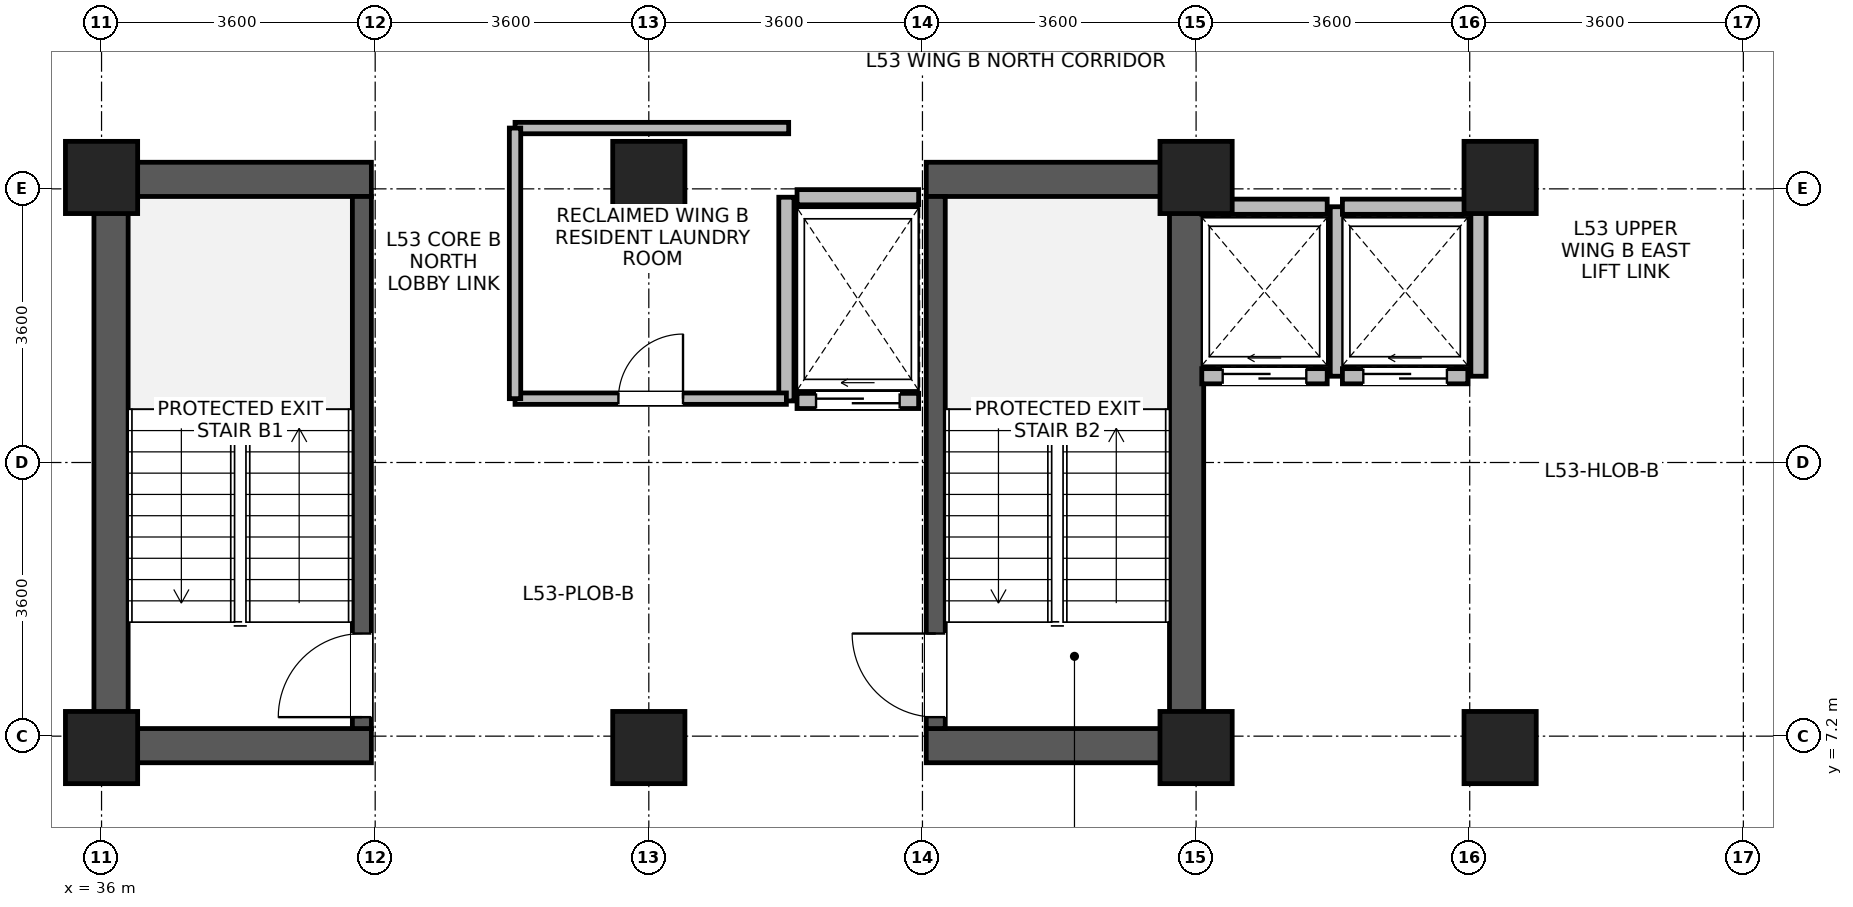
"""IFC4 building model, lengths in metres.
Left out: names, types, materials, properties, quantities, classifications, styles, units other than length and angle.
Written with IfcOpenShell. Run it as: python <this file> out.ifc"""

import sys

from ifc_helpers import new_model, si_unit, direction, frame, frame_2d, origin, origin_2d, place, context, subcontext, project, spatial, rectangle, extrude, source, transform, mapped, element, fill, save


model = new_model("IFC4")
c1 = context("Model", 3, precision=1e-05, world=origin(), true_north=direction((0.0, 1.0)))
c2 = subcontext(c1, "Body", "Model", "MODEL_VIEW")
j1 = project(units=[si_unit("LENGTHUNIT", "METRE"), si_unit("PLANEANGLEUNIT", "RADIAN")], contexts=[c1])
p1 = place(None, origin())
s1 = spatial("IfcSite", under=j1, at=p1, CompositionType="ELEMENT")
p2 = place(p1, origin())
s2 = spatial("IfcBuilding", under=s1, at=p2, CompositionType="ELEMENT")
p3 = place(p2, frame((0.0, 0.0, 209.2)))
s3 = spatial("IfcBuildingStorey", under=s2, at=p3, CompositionType="ELEMENT", Elevation=209.2)
for number, where, z_axis, x_axis in (
    (1, (36.125, 6.85, 0.0), (0.0, 0.0, 1.0), (0.0, 1.0, 0.0)),
    (2, (50.275, 6.85, 0.0), (0.0, 0.0, 1.0), (0.0, 1.0, 0.0)),
):
    element("IfcWall", number, at=place(p3, frame(where, z_axis=z_axis, x_axis=x_axis)), inside=s3, PredefinedType="SHEAR", context=c2, shape_type="SweptSolid", body=[
        extrude(rectangle(XDim=7.9, YDim=0.45, at=frame_2d((3.95, 0.0))), origin(), (0.0, 0.0, 1.0), 3.47),
    ])
for number, where, z_axis, x_axis in (
    (3, (36.35, 7.075, 0.0), (0.0, 0.0, 1.0), (1.0, 0.0, 0.0)),
    (4, (46.85, 7.075, 0.0), (0.0, 0.0, 1.0), (1.0, 0.0, 0.0)),
    (5, (36.35, 14.525, 0.0), (0.0, 0.0, 1.0), (1.0, 0.0, 0.0)),
    (6, (46.85, 14.525, 0.0), (0.0, 0.0, 1.0), (1.0, 0.0, 0.0)),
):
    element("IfcWall", number, at=place(p3, frame(where, z_axis=z_axis, x_axis=x_axis)), inside=s3, PredefinedType="SHEAR", context=c2, shape_type="SweptSolid", body=[
        extrude(rectangle(XDim=3.2, YDim=0.45, at=frame_2d((1.6, 0.0))), origin(), (0.0, 0.0, 1.0), 3.47),
    ])
p4 = place(p3, frame((39.425, 7.3, 0.0), z_axis=(0.0, 0.0, 1.0), x_axis=(0.0, 1.0, 0.0)))
e7 = element("IfcWall", 7, at=p4, inside=s3, PredefinedType="SHEAR", context=c2, shape_type="SweptSolid", body=[
    extrude(rectangle(XDim=7.0, YDim=0.25, at=frame_2d((3.5, 0.0))), origin(), (0.0, 0.0, 1.0), 3.47),
])
p5 = place(p4, frame((0.15, 0.0, 0.0)))
e8 = element("IfcOpeningElement", 8, at=p5, cuts=e7, PredefinedType="OPENING", context=c2, shape_type="SweptSolid", body=[
    extrude(rectangle(XDim=1.1, YDim=2.08, at=frame_2d((0.55, 1.04))), frame((0.0, 0.135, 0.0), z_axis=(0.0, -1.0, 0.0), x_axis=(1.0, 0.0, 0.0)), (0.0, 0.0, 1.0), 0.27),
])
p6 = place(p3, frame((46.975, 7.3, 0.0), z_axis=(0.0, 0.0, 1.0), x_axis=(0.0, 1.0, 0.0)))
e9 = element("IfcWall", 9, at=p6, inside=s3, PredefinedType="SHEAR", context=c2, shape_type="SweptSolid", body=[
    extrude(rectangle(XDim=7.0, YDim=0.25, at=frame_2d((3.5, 0.0))), origin(), (0.0, 0.0, 1.0), 3.47),
])
p7 = place(p6, frame((0.15, 0.0, 0.0)))
e10 = element("IfcOpeningElement", 10, at=p7, cuts=e9, PredefinedType="OPENING", context=c2, shape_type="SweptSolid", body=[
    extrude(rectangle(XDim=1.1, YDim=2.08, at=frame_2d((0.55, 1.04))), frame((0.0, 0.135, 0.0), z_axis=(0.0, -1.0, 0.0), x_axis=(1.0, 0.0, 0.0)), (0.0, 0.0, 1.0), 0.27),
])
m1 = source(origin(), c2, "Body", "SweptSolid", [
    extrude(rectangle(XDim=0.95, YDim=0.95, at=origin_2d()), origin(), (0.0, 0.0, 1.0), 3.7),
])
for number, where, z_axis, x_axis in (
    (11, (36.0, 7.05, 0.0), (0.0, 0.0, 1.0), (1.0, 0.0, 0.0)),
    (12, (36.0, 14.55, 0.0), (0.0, 0.0, 1.0), (1.0, 0.0, 0.0)),
    (13, (43.2, 7.05, 0.0), (0.0, 0.0, 1.0), (1.0, 0.0, 0.0)),
    (14, (43.2, 14.55, 0.0), (0.0, 0.0, 1.0), (1.0, 0.0, 0.0)),
    (15, (50.4, 7.05, 0.0), (0.0, 0.0, 1.0), (1.0, 0.0, 0.0)),
    (16, (50.4, 14.55, 0.0), (0.0, 0.0, 1.0), (1.0, 0.0, 0.0)),
    (17, (54.4, 7.05, 0.0), (0.0, 0.0, 1.0), (1.0, 0.0, 0.0)),
    (18, (54.4, 14.55, 0.0), (0.0, 0.0, 1.0), (1.0, 0.0, 0.0)),
):
    element("IfcColumn", number, at=place(p3, frame(where, z_axis=z_axis, x_axis=x_axis)), inside=s3, PredefinedType="COLUMN", context=c2, shape_type="MappedRepresentation", body=[
        mapped(m1, transform((0.0, 0.0, 0.0), x_axis=(1.0, 0.0, 0.0), y_axis=(0.0, 1.0, 0.0), z_axis=(0.0, 0.0, 1.0), scale=1.0)),
    ])
p8 = place(p3, frame((50.475, 11.935, 0.0), z_axis=(0.0, 0.0, 1.0), x_axis=(1.0, 0.0, 0.0)))
e19 = element("IfcWall", 19, at=p8, inside=s3, PredefinedType="PARTITIONING", context=c2, shape_type="SweptSolid", body=[
    extrude(rectangle(XDim=1.65, YDim=0.2, at=frame_2d((0.825, 0.0))), origin(), (0.0, 0.0, 1.0), 3.45),
])
p9 = place(p8, frame((0.275, 0.0, 0.0)))
e20 = element("IfcOpeningElement", 20, at=p9, cuts=e19, PredefinedType="OPENING", context=c2, shape_type="SweptSolid", body=[
    extrude(rectangle(XDim=1.1, YDim=2.12, at=frame_2d((0.55, 1.06))), frame((0.0, 0.11, 0.0), z_axis=(0.0, -1.0, 0.0), x_axis=(1.0, 0.0, 0.0)), (0.0, 0.0, 1.0), 0.22),
])
p10 = place(p3, frame((50.475, 14.165, 0.0), z_axis=(0.0, 0.0, 1.0), x_axis=(1.0, 0.0, 0.0)))
e21 = element("IfcWall", 21, at=p10, inside=s3, PredefinedType="PARTITIONING", context=c2, shape_type="SweptSolid", body=[
    extrude(rectangle(XDim=1.65, YDim=0.2, at=frame_2d((0.825, 0.0))), origin(), (0.0, 0.0, 1.0), 3.45),
])
p11 = place(p3, frame((52.265, 11.935, 0.0), z_axis=(0.0, 0.0, 1.0), x_axis=(0.0, 1.0, 0.0)))
e22 = element("IfcWall", 22, at=p11, inside=s3, PredefinedType="PARTITIONING", context=c2, shape_type="SweptSolid", body=[
    extrude(rectangle(XDim=2.23, YDim=0.2, at=frame_2d((1.115, 0.0))), origin(), (0.0, 0.0, 1.0), 3.45),
])
p12 = place(p3, frame((52.325, 11.935, 0.0), z_axis=(0.0, 0.0, 1.0), x_axis=(1.0, 0.0, 0.0)))
e23 = element("IfcWall", 23, at=p12, inside=s3, PredefinedType="PARTITIONING", context=c2, shape_type="SweptSolid", body=[
    extrude(rectangle(XDim=1.65, YDim=0.2, at=frame_2d((0.825, 0.0))), origin(), (0.0, 0.0, 1.0), 3.45),
])
p13 = place(p12, frame((0.275, 0.0, 0.0)))
e24 = element("IfcOpeningElement", 24, at=p13, cuts=e23, PredefinedType="OPENING", context=c2, shape_type="SweptSolid", body=[
    extrude(rectangle(XDim=1.1, YDim=2.12, at=frame_2d((0.55, 1.06))), frame((0.0, 0.11, 0.0), z_axis=(0.0, -1.0, 0.0), x_axis=(1.0, 0.0, 0.0)), (0.0, 0.0, 1.0), 0.22),
])
p14 = place(p3, frame((52.325, 14.165, 0.0), z_axis=(0.0, 0.0, 1.0), x_axis=(1.0, 0.0, 0.0)))
e25 = element("IfcWall", 25, at=p14, inside=s3, PredefinedType="PARTITIONING", context=c2, shape_type="SweptSolid", body=[
    extrude(rectangle(XDim=1.65, YDim=0.2, at=frame_2d((0.825, 0.0))), origin(), (0.0, 0.0, 1.0), 3.45),
])
p15 = place(p3, frame((54.115, 11.935, 0.0), z_axis=(0.0, 0.0, 1.0), x_axis=(0.0, 1.0, 0.0)))
e26 = element("IfcWall", 26, at=p15, inside=s3, PredefinedType="PARTITIONING", context=c2, shape_type="SweptSolid", body=[
    extrude(rectangle(XDim=2.23, YDim=0.2, at=frame_2d((1.115, 0.0))), origin(), (0.0, 0.0, 1.0), 3.45),
])
p16 = place(p3, frame((45.15, 11.61, 0.0), z_axis=(0.0, 0.0, 1.0), x_axis=(1.0, 0.0, 0.0)))
e27 = element("IfcWall", 27, at=p16, inside=s3, PredefinedType="PARTITIONING", context=c2, shape_type="SweptSolid", body=[
    extrude(rectangle(XDim=1.6, YDim=0.2, at=frame_2d((0.8, 0.0))), origin(), (0.0, 0.0, 1.0), 3.45),
])
p17 = place(p16, frame((0.25, 0.0, 0.0)))
e28 = element("IfcOpeningElement", 28, at=p17, cuts=e27, PredefinedType="OPENING", context=c2, shape_type="SweptSolid", body=[
    extrude(rectangle(XDim=1.1, YDim=2.12, at=frame_2d((0.55, 1.06))), frame((0.0, 0.11, 0.0), z_axis=(0.0, -1.0, 0.0), x_axis=(1.0, 0.0, 0.0)), (0.0, 0.0, 1.0), 0.22),
])
p18 = place(p3, frame((45.15, 14.29, 0.0), z_axis=(0.0, 0.0, 1.0), x_axis=(1.0, 0.0, 0.0)))
e29 = element("IfcWall", 29, at=p18, inside=s3, PredefinedType="PARTITIONING", context=c2, shape_type="SweptSolid", body=[
    extrude(rectangle(XDim=1.6, YDim=0.2, at=frame_2d((0.8, 0.0))), origin(), (0.0, 0.0, 1.0), 2.45),
])
p19 = place(p3, frame((45.01, 11.61, 0.0), z_axis=(0.0, 0.0, 1.0), x_axis=(0.0, 1.0, 0.0)))
e30 = element("IfcWall", 30, at=p19, inside=s3, PredefinedType="PARTITIONING", context=c2, shape_type="SweptSolid", body=[
    extrude(rectangle(XDim=2.68, YDim=0.2, at=frame_2d((1.34, 0.0))), origin(), (0.0, 0.0, 1.0), 3.45),
])
p20 = place(p3, frame((41.44, 11.64, 0.0), z_axis=(0.0, 0.0, 1.0), x_axis=(1.0, 0.0, 0.0)))
e31 = element("IfcWall", 31, at=p20, inside=s3, PredefinedType="PARTITIONING", context=c2, shape_type="SweptSolid", body=[
    extrude(rectangle(XDim=3.57, YDim=0.15, at=frame_2d((1.785, 0.0))), origin(), (0.0, 0.0, 1.0), 3.45),
])
p21 = place(p20, frame((1.36, 0.0, 0.0)))
e32 = element("IfcOpeningElement", 32, at=p21, cuts=e31, PredefinedType="OPENING", context=c2, shape_type="SweptSolid", body=[
    extrude(rectangle(XDim=0.85, YDim=2.04, at=frame_2d((0.425, 1.02))), frame((0.0, 0.085, 0.0), z_axis=(0.0, -1.0, 0.0), x_axis=(1.0, 0.0, 0.0)), (0.0, 0.0, 1.0), 0.17),
])
p22 = place(p3, frame((41.44, 15.2, 0.0), z_axis=(0.0, 0.0, 1.0), x_axis=(1.0, 0.0, 0.0)))
e33 = element("IfcWall", 33, at=p22, inside=s3, PredefinedType="PARTITIONING", context=c2, shape_type="SweptSolid", body=[
    extrude(rectangle(XDim=3.6, YDim=0.15, at=frame_2d((1.8, 0.0))), origin(), (0.0, 0.0, 1.0), 3.45),
])
p23 = place(p3, frame((41.44, 11.64, 0.0), z_axis=(0.0, 0.0, 1.0), x_axis=(0.0, 1.0, 0.0)))
e34 = element("IfcWall", 34, at=p23, inside=s3, PredefinedType="PARTITIONING", context=c2, shape_type="SweptSolid", body=[
    extrude(rectangle(XDim=3.56, YDim=0.15, at=frame_2d((1.78, 0.0))), origin(), (0.0, 0.0, 1.0), 3.45),
])
p24 = place(p5, origin())
e35 = element("IfcDoor", 35, at=p24, inside=s3, OperationType="SINGLE_SWING_LEFT", PredefinedType="DOOR", context=c2, shape_type="SweptSolid", body=[
    extrude(rectangle(XDim=1.1, YDim=2.08, at=frame_2d((0.55, 1.04))), frame((0.0, 0.025, 0.0), z_axis=(0.0, -1.0, 0.0), x_axis=(1.0, 0.0, 0.0)), (0.0, 0.0, 1.0), 0.05),
])
fill(e8, e35)
p25 = place(p7, origin())
e36 = element("IfcDoor", 36, at=p25, inside=s3, OperationType="SINGLE_SWING_RIGHT", PredefinedType="DOOR", context=c2, shape_type="SweptSolid", body=[
    extrude(rectangle(XDim=1.1, YDim=2.08, at=frame_2d((0.55, 1.04))), frame((0.0, 0.025, 0.0), z_axis=(0.0, -1.0, 0.0), x_axis=(1.0, 0.0, 0.0)), (0.0, 0.0, 1.0), 0.05),
])
fill(e10, e36)
p26 = place(p9, origin())
e37 = element("IfcDoor", 37, at=p26, inside=s3, OperationType="SLIDING_TO_LEFT", PredefinedType="DOOR", context=c2, shape_type="SweptSolid", body=[
    extrude(rectangle(XDim=1.1, YDim=2.12, at=frame_2d((0.55, 1.06))), frame((0.0, 0.025, 0.0), z_axis=(0.0, -1.0, 0.0), x_axis=(1.0, 0.0, 0.0)), (0.0, 0.0, 1.0), 0.05),
])
fill(e20, e37)
p27 = place(p13, origin())
e38 = element("IfcDoor", 38, at=p27, inside=s3, OperationType="SLIDING_TO_LEFT", PredefinedType="DOOR", context=c2, shape_type="SweptSolid", body=[
    extrude(rectangle(XDim=1.1, YDim=2.12, at=frame_2d((0.55, 1.06))), frame((0.0, 0.025, 0.0), z_axis=(0.0, -1.0, 0.0), x_axis=(1.0, 0.0, 0.0)), (0.0, 0.0, 1.0), 0.05),
])
fill(e24, e38)
p28 = place(p17, origin())
e39 = element("IfcDoor", 39, at=p28, inside=s3, OperationType="SLIDING_TO_LEFT", PredefinedType="DOOR", context=c2, shape_type="SweptSolid", body=[
    extrude(rectangle(XDim=1.1, YDim=2.12, at=frame_2d((0.55, 1.06))), frame((0.0, 0.025, 0.0), z_axis=(0.0, -1.0, 0.0), x_axis=(1.0, 0.0, 0.0)), (0.0, 0.0, 1.0), 0.05),
])
fill(e28, e39)
p29 = place(p21, origin())
e40 = element("IfcDoor", 40, at=p29, inside=s3, OperationType="SINGLE_SWING_RIGHT", PredefinedType="DOOR", context=c2, shape_type="SweptSolid", body=[
    extrude(rectangle(XDim=0.85, YDim=2.04, at=frame_2d((0.425, 1.02))), frame((0.0, 0.025, 0.0), z_axis=(0.0, -1.0, 0.0), x_axis=(1.0, 0.0, 0.0)), (0.0, 0.0, 1.0), 0.05),
])
fill(e32, e40)
save(model, sys.argv[1])
